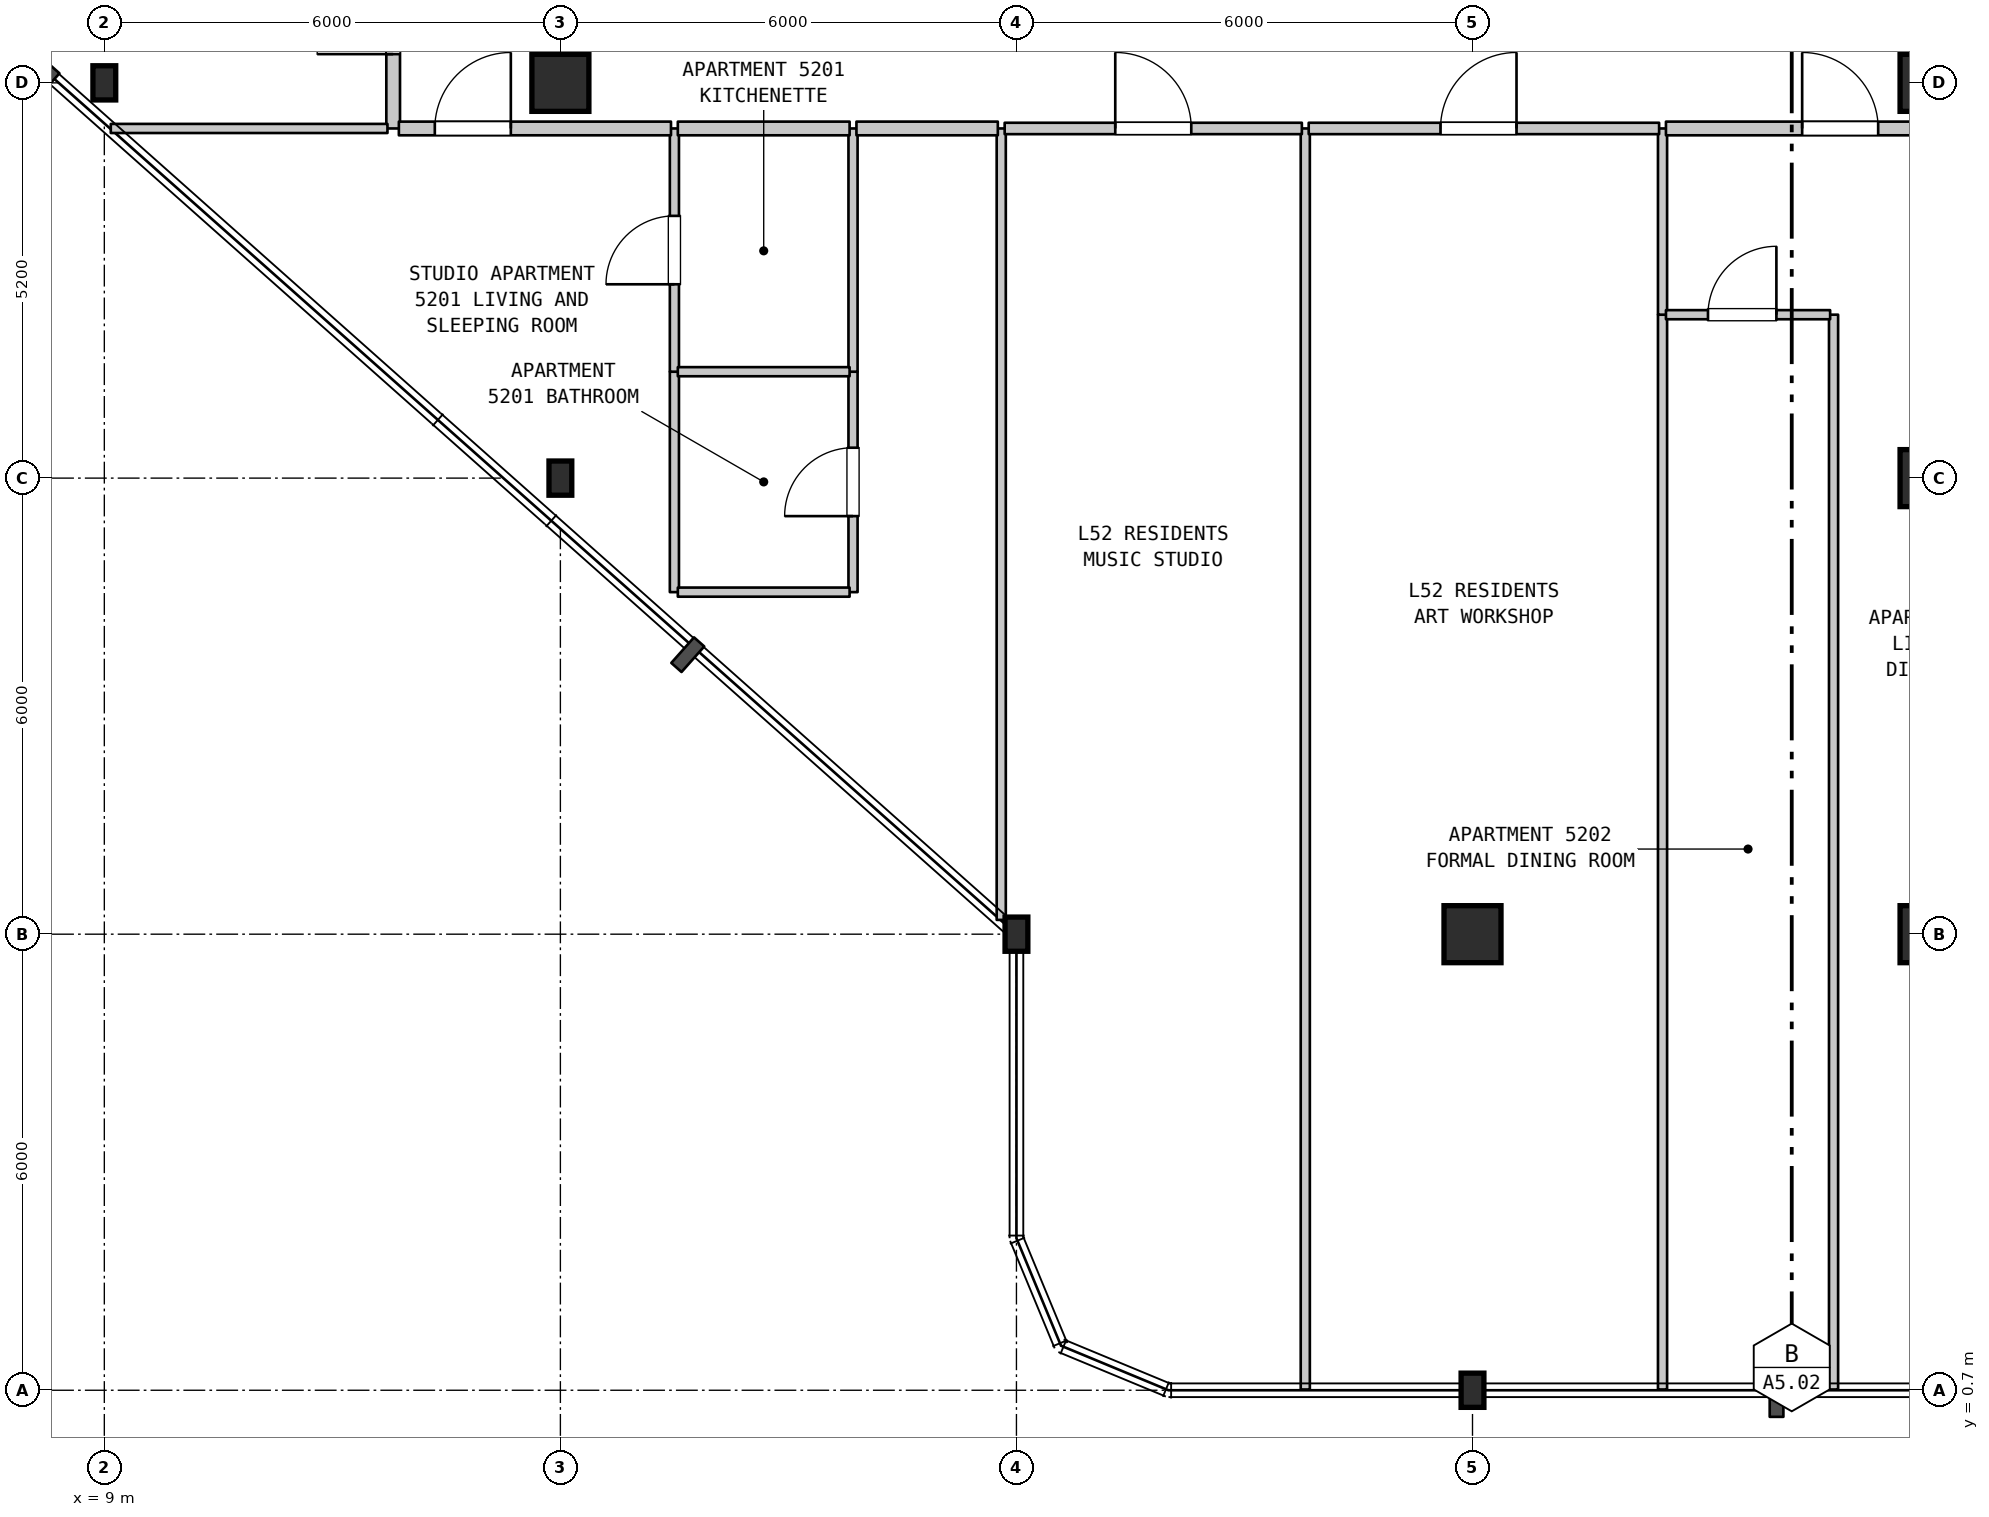
"""IFC4 building model, lengths in metres.
Left out: names, types, materials, properties, quantities, classifications, styles, units other than length and angle.
Written with IfcOpenShell. Run it as: python <this file> out.ifc"""

import sys

from ifc_helpers import new_model, si_unit, direction, frame, frame_2d, origin, origin_2d, place, context, subcontext, project, spatial, rectangle, i_section, extrude, element, fill, save


model = new_model("IFC4")
c1 = context("Model", 3, precision=1e-05, world=origin(), true_north=direction((0.0, 1.0)))
c2 = subcontext(c1, "Body", "Model", "MODEL_VIEW")
j1 = project(units=[si_unit("LENGTHUNIT", "METRE"), si_unit("PLANEANGLEUNIT", "RADIAN")], contexts=[c1])
p1 = place(None, origin())
s1 = spatial("IfcSite", under=j1, at=p1, CompositionType="ELEMENT")
p2 = place(p1, origin())
s2 = spatial("IfcBuilding", under=s1, at=p2, CompositionType="ELEMENT")
p3 = place(p2, frame((0.0, 0.0, 210.6)))
s3 = spatial("IfcBuildingStorey", under=s2, at=p3, CompositionType="ELEMENT", Elevation=210.6)
for number, where, z_axis, x_axis in (
    (1, (9.0, 17.9, 0.0), (0.0, 0.0, 1.0), (1.0, 0.0, 0.0)),
    (2, (15.0, 12.7, 0.0), (0.0, 0.0, 1.0), (1.0, 0.0, 0.0)),
):
    element("IfcColumn", number, at=place(p3, frame(where, z_axis=z_axis, x_axis=x_axis)), inside=s3, PredefinedType="COLUMN", context=c2, shape_type="SweptSolid", body=[
        extrude(i_section(OverallWidth=0.3, OverallDepth=0.45, WebThickness=0.014, FlangeThickness=0.026, FilletRadius=0.027, at=origin_2d()), origin(), (0.0, 0.0, 1.0), 3.7),
    ])
p4 = place(p3, frame((15.0, 17.9, 0.0), z_axis=(0.0, 0.0, 1.0), x_axis=(1.0, 0.0, 0.0)))
e3 = element("IfcColumn", 3, at=p4, inside=s3, PredefinedType="COLUMN", context=c2, shape_type="SweptSolid", body=[
    extrude(rectangle(XDim=0.75, YDim=0.75, at=origin_2d()), origin(), (0.0, 0.0, 1.0), 3.7),
])
for number, where, z_axis, x_axis in (
    (4, (21.0, 6.7, 0.0), (0.0, 0.0, 1.0), (1.0, 0.0, 0.0)),
    (5, (27.0, 0.7, 0.0), (0.0, 0.0, 1.0), (1.0, 0.0, 0.0)),
):
    element("IfcColumn", number, at=place(p3, frame(where, z_axis=z_axis, x_axis=x_axis)), inside=s3, PredefinedType="COLUMN", context=c2, shape_type="SweptSolid", body=[
        extrude(i_section(OverallWidth=0.3, OverallDepth=0.45, WebThickness=0.014, FlangeThickness=0.026, FilletRadius=0.027, at=origin_2d()), origin(), (0.0, 0.0, 1.0), 3.7),
    ])
for number, where, z_axis, x_axis in (
    (6, (27.0, 6.7, 0.0), (0.0, 0.0, 1.0), (1.0, 0.0, 0.0)),
    (7, (33.0, 6.7, 0.0), (0.0, 0.0, 1.0), (1.0, 0.0, 0.0)),
    (8, (33.0, 12.7, 0.0), (0.0, 0.0, 1.0), (1.0, 0.0, 0.0)),
    (9, (33.0, 17.9, 0.0), (0.0, 0.0, 1.0), (1.0, 0.0, 0.0)),
):
    element("IfcColumn", number, at=place(p3, frame(where, z_axis=z_axis, x_axis=x_axis)), inside=s3, PredefinedType="COLUMN", context=c2, shape_type="SweptSolid", body=[
        extrude(rectangle(XDim=0.75, YDim=0.75, at=origin_2d()), origin(), (0.0, 0.0, 1.0), 3.7),
    ])
p5 = place(p3, frame((12.8, 17.3, 0.0), z_axis=(0.0, 0.0, 1.0), x_axis=(0.0, 1.0, 0.0)))
e10 = element("IfcWall", 10, at=p5, inside=s3, PredefinedType="STANDARD", context=c2, shape_type="SweptSolid", body=[
    extrude(rectangle(XDim=3.1, YDim=0.18, at=frame_2d((1.55, 0.0))), origin(), (0.0, 0.0, 1.0), 3.39),
])
p6 = place(p5, frame((0.978, 0.0, 0.0)))
e11 = element("IfcOpeningElement", 11, at=p6, cuts=e10, PredefinedType="OPENING", context=c2, shape_type="SweptSolid", body=[
    extrude(rectangle(XDim=1.0, YDim=2.15, at=frame_2d((0.5, 1.075))), frame((0.0, 0.1, 0.0), z_axis=(0.0, -1.0, 0.0), x_axis=(1.0, 0.0, 0.0)), (0.0, 0.0, 1.0), 0.2),
])
p7 = place(p3, frame((16.5, 11.2, 0.0), z_axis=(0.0, 0.0, 1.0), x_axis=(0.0, 1.0, 0.0)))
e12 = element("IfcWall", 12, at=p7, inside=s3, PredefinedType="PARTITIONING", context=c2, shape_type="SweptSolid", body=[
    extrude(rectangle(XDim=2.9, YDim=0.12, at=frame_2d((1.45, 0.0))), origin(), (0.0, 0.0, 1.0), 3.39),
])
p8 = place(p3, frame((16.5, 14.1, 0.0), z_axis=(0.0, 0.0, 1.0), x_axis=(0.0, 1.0, 0.0)))
e13 = element("IfcWall", 13, at=p8, inside=s3, PredefinedType="PARTITIONING", context=c2, shape_type="SweptSolid", body=[
    extrude(rectangle(XDim=3.2, YDim=0.12, at=frame_2d((1.6, 0.0))), origin(), (0.0, 0.0, 1.0), 3.39),
])
p9 = place(p8, frame((1.15, 0.0, 0.0)))
e14 = element("IfcOpeningElement", 14, at=p9, cuts=e13, PredefinedType="OPENING", context=c2, shape_type="SweptSolid", body=[
    extrude(rectangle(XDim=0.9, YDim=2.15, at=frame_2d((0.45, 1.075))), frame((0.0, 0.07, 0.0), z_axis=(0.0, -1.0, 0.0), x_axis=(1.0, 0.0, 0.0)), (0.0, 0.0, 1.0), 0.14),
])
p10 = place(p3, frame((18.85, 11.2, 0.0), z_axis=(0.0, 0.0, 1.0), x_axis=(0.0, 1.0, 0.0)))
e15 = element("IfcWall", 15, at=p10, inside=s3, PredefinedType="PARTITIONING", context=c2, shape_type="SweptSolid", body=[
    extrude(rectangle(XDim=2.9, YDim=0.12, at=frame_2d((1.45, 0.0))), origin(), (0.0, 0.0, 1.0), 3.39),
])
p11 = place(p10, frame((1.0, 0.0, 0.0)))
e16 = element("IfcOpeningElement", 16, at=p11, cuts=e15, PredefinedType="OPENING", context=c2, shape_type="SweptSolid", body=[
    extrude(rectangle(XDim=0.9, YDim=2.1, at=frame_2d((0.45, 1.05))), frame((0.0, 0.07, 0.0), z_axis=(0.0, -1.0, 0.0), x_axis=(1.0, 0.0, 0.0)), (0.0, 0.0, 1.0), 0.14),
])
p12 = place(p3, frame((18.85, 14.1, 0.0), z_axis=(0.0, 0.0, 1.0), x_axis=(0.0, 1.0, 0.0)))
e17 = element("IfcWall", 17, at=p12, inside=s3, PredefinedType="PARTITIONING", context=c2, shape_type="SweptSolid", body=[
    extrude(rectangle(XDim=3.2, YDim=0.12, at=frame_2d((1.6, 0.0))), origin(), (0.0, 0.0, 1.0), 3.39),
])
p13 = place(p3, frame((20.8, 6.888, 0.0), z_axis=(0.0, 0.0, 1.0), x_axis=(0.0, 1.0, 0.0)))
e18 = element("IfcWall", 18, at=p13, inside=s3, PredefinedType="PARTITIONING", context=c2, shape_type="SweptSolid", body=[
    extrude(rectangle(XDim=10.412, YDim=0.12, at=frame_2d((5.206, 0.0))), origin(), (0.0, 0.0, 1.0), 3.39),
])
p14 = place(p3, frame((24.8, 0.71, 0.0), z_axis=(0.0, 0.0, 1.0), x_axis=(0.0, 1.0, 0.0)))
e19 = element("IfcWall", 19, at=p14, inside=s3, PredefinedType="PARTITIONING", context=c2, shape_type="SweptSolid", body=[
    extrude(rectangle(XDim=16.59, YDim=0.12, at=frame_2d((8.295, 0.0))), origin(), (0.0, 0.0, 1.0), 3.39),
])
p15 = place(p3, frame((29.5, 0.71, 0.0), z_axis=(0.0, 0.0, 1.0), x_axis=(0.0, 1.0, 0.0)))
e20 = element("IfcWall", 20, at=p15, inside=s3, PredefinedType="PARTITIONING", context=c2, shape_type="SweptSolid", body=[
    extrude(rectangle(XDim=14.14, YDim=0.12, at=frame_2d((7.07, 0.0))), origin(), (0.0, 0.0, 1.0), 3.39),
])
p16 = place(p3, frame((29.5, 14.85, 0.0), z_axis=(0.0, 0.0, 1.0), x_axis=(0.0, 1.0, 0.0)))
e21 = element("IfcWall", 21, at=p16, inside=s3, PredefinedType="PARTITIONING", context=c2, shape_type="SweptSolid", body=[
    extrude(rectangle(XDim=2.45, YDim=0.12, at=frame_2d((1.225, 0.0))), origin(), (0.0, 0.0, 1.0), 3.39),
])
p17 = place(p3, frame((31.75, 0.71, 0.0), z_axis=(0.0, 0.0, 1.0), x_axis=(0.0, 1.0, 0.0)))
e22 = element("IfcWall", 22, at=p17, inside=s3, PredefinedType="PARTITIONING", context=c2, shape_type="SweptSolid", body=[
    extrude(rectangle(XDim=14.14, YDim=0.12, at=frame_2d((7.07, 0.0))), origin(), (0.0, 0.0, 1.0), 3.39),
])
for number, where, z_axis, x_axis in (
    (23, (16.545, 11.2, 0.0), (0.0, 0.0, 1.0), (1.0, 0.0, 0.0)),
    (24, (16.545, 14.1, 0.0), (0.0, 0.0, 1.0), (1.0, 0.0, 0.0)),
):
    element("IfcWall", number, at=place(p3, frame(where, z_axis=z_axis, x_axis=x_axis)), inside=s3, PredefinedType="PARTITIONING", context=c2, shape_type="SweptSolid", body=[
        extrude(rectangle(XDim=2.26, YDim=0.12, at=frame_2d((1.13, 0.0))), origin(), (0.0, 0.0, 1.0), 3.39),
    ])
p18 = place(p3, frame((29.545, 14.85, 0.0), z_axis=(0.0, 0.0, 1.0), x_axis=(1.0, 0.0, 0.0)))
e25 = element("IfcWall", 25, at=p18, inside=s3, PredefinedType="PARTITIONING", context=c2, shape_type="SweptSolid", body=[
    extrude(rectangle(XDim=2.16, YDim=0.12, at=frame_2d((1.08, 0.0))), origin(), (0.0, 0.0, 1.0), 3.39),
])
p19 = place(p18, frame((0.553, 0.0, 0.0)))
e26 = element("IfcOpeningElement", 26, at=p19, cuts=e25, PredefinedType="OPENING", context=c2, shape_type="SweptSolid", body=[
    extrude(rectangle(XDim=0.9, YDim=2.15, at=frame_2d((0.45, 1.075))), frame((0.0, 0.07, 0.0), z_axis=(0.0, -1.0, 0.0), x_axis=(1.0, 0.0, 0.0)), (0.0, 0.0, 1.0), 0.14),
])
p20 = place(p3, frame((9.085, 17.3, 0.0), z_axis=(0.0, 0.0, 1.0), x_axis=(1.0, 0.0, 0.0)))
e27 = element("IfcWall", 27, at=p20, inside=s3, PredefinedType="PARTITIONING", context=c2, shape_type="SweptSolid", body=[
    extrude(rectangle(XDim=3.64, YDim=0.12, at=frame_2d((1.82, 0.0))), origin(), (0.0, 0.0, 1.0), 3.39),
])
p21 = place(p3, frame((12.875, 17.3, 0.0), z_axis=(0.0, 0.0, 1.0), x_axis=(1.0, 0.0, 0.0)))
e28 = element("IfcWall", 28, at=p21, inside=s3, PredefinedType="STANDARD", context=c2, shape_type="SweptSolid", body=[
    extrude(rectangle(XDim=3.58, YDim=0.18, at=frame_2d((1.79, 0.0))), origin(), (0.0, 0.0, 1.0), 3.39),
])
p22 = place(p21, frame((0.473, 0.0, 0.0)))
e29 = element("IfcOpeningElement", 29, at=p22, cuts=e28, PredefinedType="OPENING", context=c2, shape_type="SweptSolid", body=[
    extrude(rectangle(XDim=1.0, YDim=2.15, at=frame_2d((0.5, 1.075))), frame((0.0, 0.1, 0.0), z_axis=(0.0, -1.0, 0.0), x_axis=(1.0, 0.0, 0.0)), (0.0, 0.0, 1.0), 0.2),
])
p23 = place(p3, frame((16.545, 17.3, 0.0), z_axis=(0.0, 0.0, 1.0), x_axis=(1.0, 0.0, 0.0)))
e30 = element("IfcWall", 30, at=p23, inside=s3, PredefinedType="STANDARD", context=c2, shape_type="SweptSolid", body=[
    extrude(rectangle(XDim=2.26, YDim=0.18, at=frame_2d((1.13, 0.0))), origin(), (0.0, 0.0, 1.0), 3.39),
])
p24 = place(p3, frame((18.895, 17.3, 0.0), z_axis=(0.0, 0.0, 1.0), x_axis=(1.0, 0.0, 0.0)))
e31 = element("IfcWall", 31, at=p24, inside=s3, PredefinedType="STANDARD", context=c2, shape_type="SweptSolid", body=[
    extrude(rectangle(XDim=1.86, YDim=0.18, at=frame_2d((0.93, 0.0))), origin(), (0.0, 0.0, 1.0), 3.39),
])
p25 = place(p3, frame((20.845, 17.3, 0.0), z_axis=(0.0, 0.0, 1.0), x_axis=(1.0, 0.0, 0.0)))
e32 = element("IfcWall", 32, at=p25, inside=s3, PredefinedType="STANDARD", context=c2, shape_type="SweptSolid", body=[
    extrude(rectangle(XDim=3.91, YDim=0.15, at=frame_2d((1.955, 0.0))), origin(), (0.0, 0.0, 1.0), 3.39),
])
p26 = place(p25, frame((1.455, 0.0, 0.0)))
e33 = element("IfcOpeningElement", 33, at=p26, cuts=e32, PredefinedType="OPENING", context=c2, shape_type="SweptSolid", body=[
    extrude(rectangle(XDim=1.0, YDim=2.15, at=frame_2d((0.5, 1.075))), frame((0.0, 0.085, 0.0), z_axis=(0.0, -1.0, 0.0), x_axis=(1.0, 0.0, 0.0)), (0.0, 0.0, 1.0), 0.17),
])
p27 = place(p3, frame((24.845, 17.3, 0.0), z_axis=(0.0, 0.0, 1.0), x_axis=(1.0, 0.0, 0.0)))
e34 = element("IfcWall", 34, at=p27, inside=s3, PredefinedType="STANDARD", context=c2, shape_type="SweptSolid", body=[
    extrude(rectangle(XDim=4.61, YDim=0.15, at=frame_2d((2.305, 0.0))), origin(), (0.0, 0.0, 1.0), 3.39),
])
p28 = place(p27, frame((1.734, 0.0, 0.0)))
e35 = element("IfcOpeningElement", 35, at=p28, cuts=e34, PredefinedType="OPENING", context=c2, shape_type="SweptSolid", body=[
    extrude(rectangle(XDim=1.0, YDim=2.15, at=frame_2d((0.5, 1.075))), frame((0.0, 0.085, 0.0), z_axis=(0.0, -1.0, 0.0), x_axis=(1.0, 0.0, 0.0)), (0.0, 0.0, 1.0), 0.17),
])
p29 = place(p3, frame((29.545, 17.3, 0.0), z_axis=(0.0, 0.0, 1.0), x_axis=(1.0, 0.0, 0.0)))
e36 = element("IfcWall", 36, at=p29, inside=s3, PredefinedType="STANDARD", context=c2, shape_type="SweptSolid", body=[
    extrude(rectangle(XDim=5.095, YDim=0.18, at=frame_2d((2.547, 0.0))), origin(), (0.0, 0.0, 1.0), 3.39),
])
p30 = place(p29, frame((1.792, 0.0, 0.0)))
e37 = element("IfcOpeningElement", 37, at=p30, cuts=e36, PredefinedType="OPENING", context=c2, shape_type="SweptSolid", body=[
    extrude(rectangle(XDim=1.0, YDim=2.15, at=frame_2d((0.5, 1.075))), frame((0.0, 0.1, 0.0), z_axis=(0.0, -1.0, 0.0), x_axis=(1.0, 0.0, 0.0)), (0.0, 0.0, 1.0), 0.2),
])
p31 = place(p6, origin())
e38 = element("IfcDoor", 38, at=p31, inside=s3, OperationType="SINGLE_SWING_LEFT", PredefinedType="DOOR", context=c2, shape_type="SweptSolid", body=[
    extrude(rectangle(XDim=1.0, YDim=2.15, at=frame_2d((0.5, 1.075))), frame((0.0, 0.025, 0.0), z_axis=(0.0, -1.0, 0.0), x_axis=(1.0, 0.0, 0.0)), (0.0, 0.0, 1.0), 0.05),
])
fill(e11, e38)
p32 = place(p9, origin())
e39 = element("IfcDoor", 39, at=p32, inside=s3, OperationType="SINGLE_SWING_LEFT", PredefinedType="DOOR", context=c2, shape_type="SweptSolid", body=[
    extrude(rectangle(XDim=0.9, YDim=2.15, at=frame_2d((0.45, 1.075))), frame((0.0, 0.025, 0.0), z_axis=(0.0, -1.0, 0.0), x_axis=(1.0, 0.0, 0.0)), (0.0, 0.0, 1.0), 0.05),
])
fill(e14, e39)
p33 = place(p11, origin())
e40 = element("IfcDoor", 40, at=p33, inside=s3, OperationType="SINGLE_SWING_LEFT", PredefinedType="DOOR", context=c2, shape_type="SweptSolid", body=[
    extrude(rectangle(XDim=0.9, YDim=2.1, at=frame_2d((0.45, 1.05))), frame((0.0, 0.025, 0.0), z_axis=(0.0, -1.0, 0.0), x_axis=(1.0, 0.0, 0.0)), (0.0, 0.0, 1.0), 0.05),
])
fill(e16, e40)
p34 = place(p19, origin())
e41 = element("IfcDoor", 41, at=p34, inside=s3, OperationType="SINGLE_SWING_RIGHT", PredefinedType="DOOR", context=c2, shape_type="SweptSolid", body=[
    extrude(rectangle(XDim=0.9, YDim=2.15, at=frame_2d((0.45, 1.075))), frame((0.0, 0.025, 0.0), z_axis=(0.0, -1.0, 0.0), x_axis=(1.0, 0.0, 0.0)), (0.0, 0.0, 1.0), 0.05),
])
fill(e26, e41)
p35 = place(p22, origin())
e42 = element("IfcDoor", 42, at=p35, inside=s3, OperationType="SINGLE_SWING_RIGHT", PredefinedType="DOOR", context=c2, shape_type="SweptSolid", body=[
    extrude(rectangle(XDim=1.0, YDim=2.15, at=frame_2d((0.5, 1.075))), frame((0.0, 0.025, 0.0), z_axis=(0.0, -1.0, 0.0), x_axis=(1.0, 0.0, 0.0)), (0.0, 0.0, 1.0), 0.05),
])
fill(e29, e42)
p36 = place(p26, origin())
e43 = element("IfcDoor", 43, at=p36, inside=s3, OperationType="SINGLE_SWING_LEFT", PredefinedType="DOOR", context=c2, shape_type="SweptSolid", body=[
    extrude(rectangle(XDim=1.0, YDim=2.15, at=frame_2d((0.5, 1.075))), frame((0.0, 0.025, 0.0), z_axis=(0.0, -1.0, 0.0), x_axis=(1.0, 0.0, 0.0)), (0.0, 0.0, 1.0), 0.05),
])
fill(e33, e43)
p37 = place(p28, origin())
e44 = element("IfcDoor", 44, at=p37, inside=s3, OperationType="SINGLE_SWING_RIGHT", PredefinedType="DOOR", context=c2, shape_type="SweptSolid", body=[
    extrude(rectangle(XDim=1.0, YDim=2.15, at=frame_2d((0.5, 1.075))), frame((0.0, 0.025, 0.0), z_axis=(0.0, -1.0, 0.0), x_axis=(1.0, 0.0, 0.0)), (0.0, 0.0, 1.0), 0.05),
])
fill(e35, e44)
p38 = place(p30, origin())
e45 = element("IfcDoor", 45, at=p38, inside=s3, OperationType="SINGLE_SWING_LEFT", PredefinedType="DOOR", context=c2, shape_type="SweptSolid", body=[
    extrude(rectangle(XDim=1.0, YDim=2.15, at=frame_2d((0.5, 1.075))), frame((0.0, 0.025, 0.0), z_axis=(0.0, -1.0, 0.0), x_axis=(1.0, 0.0, 0.0)), (0.0, 0.0, 1.0), 0.05),
])
fill(e37, e45)
save(model, sys.argv[1])
